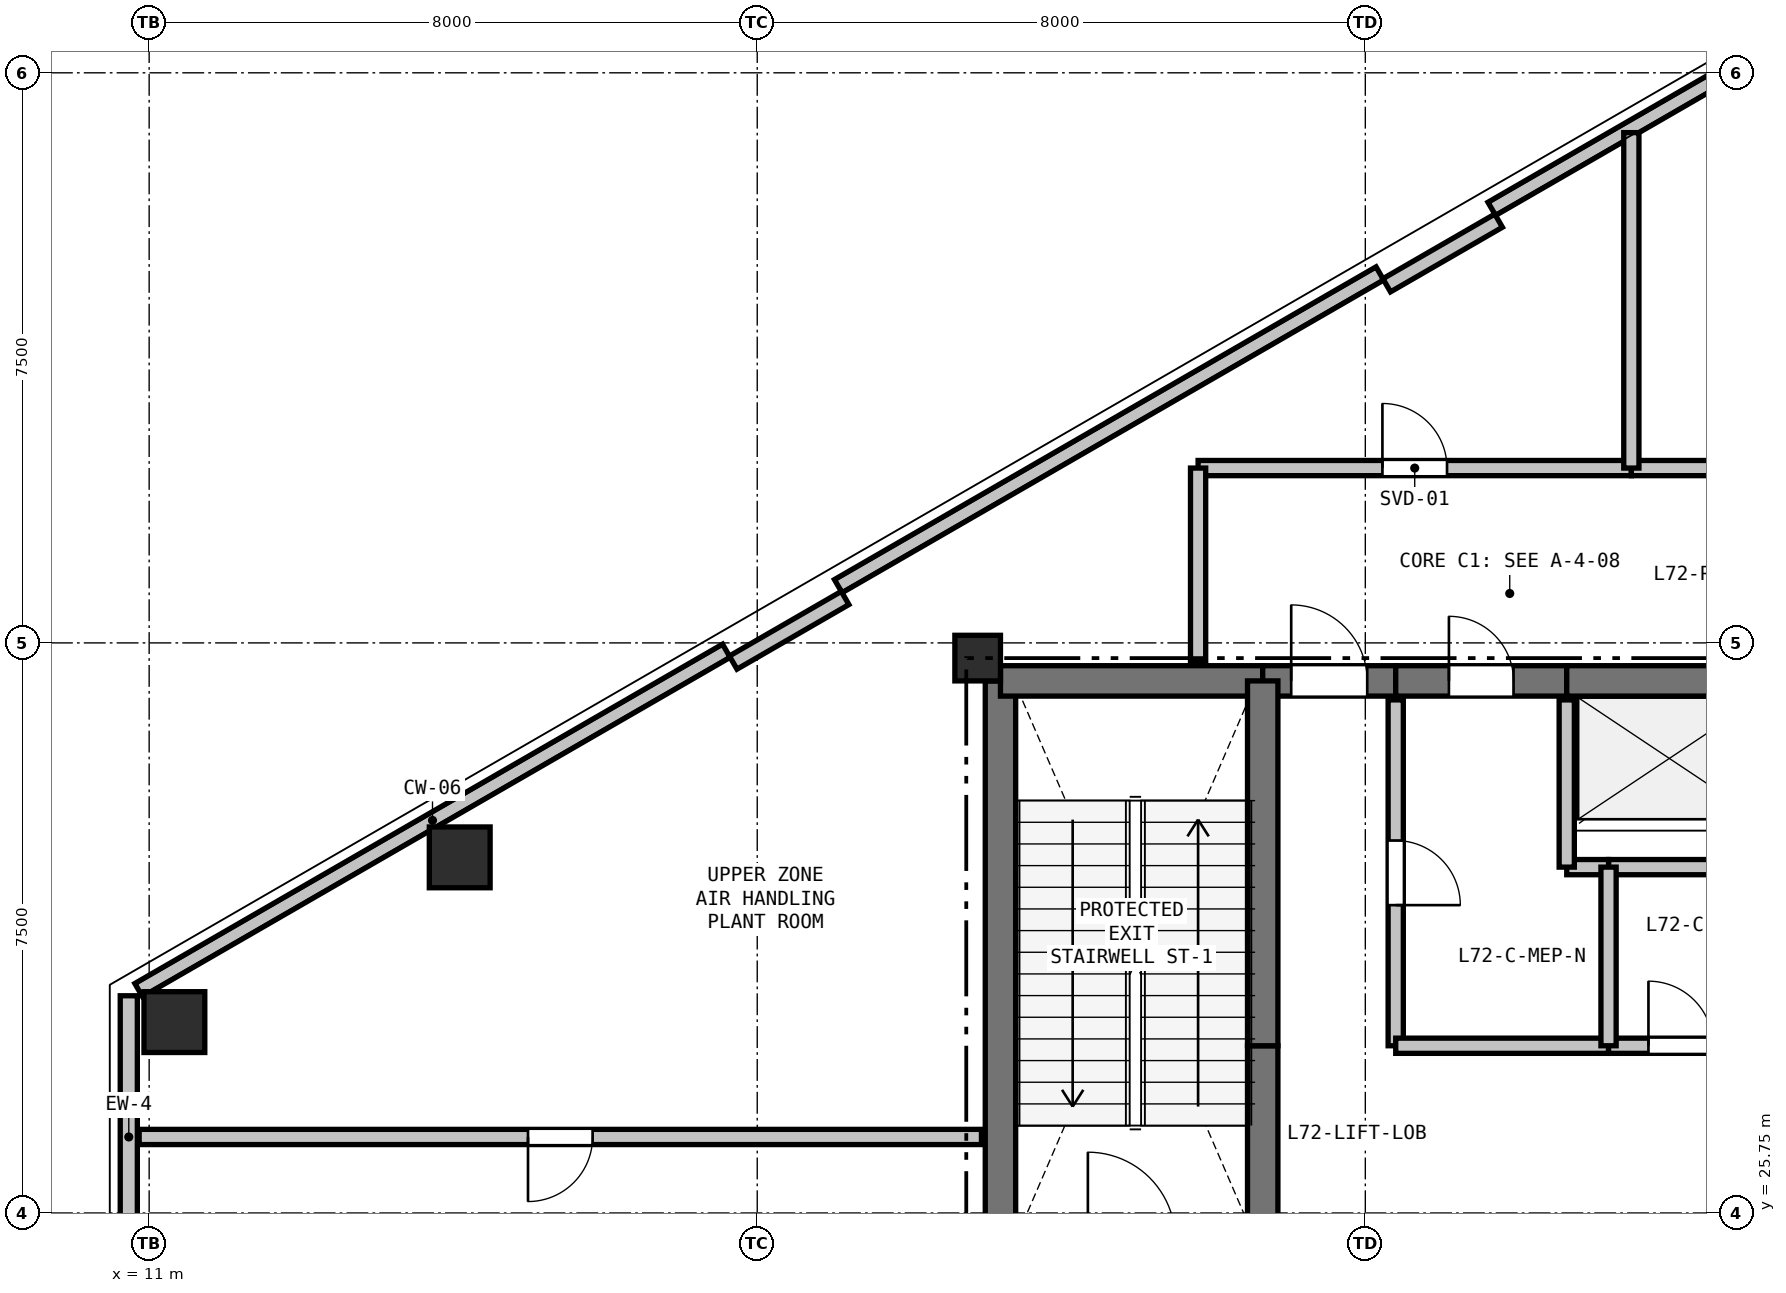
"""IFC4 building model, lengths in metres.
Left out: names, types, materials, properties, quantities, classifications, styles, units other than length and angle.
Written with IfcOpenShell. Run it as: python <this file> out.ifc"""

import sys

from ifc_helpers import new_model, si_unit, direction, frame, frame_2d, origin, origin_2d, place, context, subcontext, project, spatial, rectangle, hollow_rectangle, extrude, element, fill, save


model = new_model("IFC4")
c1 = context("Model", 3, precision=1e-05, world=origin(), true_north=direction((0.0, 1.0)))
c2 = subcontext(c1, "Body", "Model", "MODEL_VIEW")
j1 = project(units=[si_unit("LENGTHUNIT", "METRE"), si_unit("PLANEANGLEUNIT", "RADIAN")], contexts=[c1])
p1 = place(None, origin())
s1 = spatial("IfcSite", under=j1, at=p1, CompositionType="ELEMENT")
p2 = place(p1, origin())
s2 = spatial("IfcBuilding", under=s1, at=p2, CompositionType="ELEMENT")
p3 = place(p2, frame((0.0, 0.0, 258.6)))
s3 = spatial("IfcBuildingStorey", under=s2, at=p3, CompositionType="ELEMENT", Elevation=258.6)
p4 = place(p3, frame((21.9, 33.05, 0.0), z_axis=(0.0, 0.0, 1.0), x_axis=(1.0, 0.0, 0.0)))
e1 = element("IfcColumn", 1, at=p4, inside=s3, PredefinedType="COLUMN", context=c2, shape_type="SweptSolid", body=[
    extrude(rectangle(XDim=0.6, YDim=0.6, at=origin_2d()), origin(), (0.0, 0.0, 1.0), 5.4),
])
for number, where, z_axis, x_axis in (
    (2, (11.332, 28.261, 0.0), (0.0, 0.0, 1.0), (1.0, 0.0, 0.0)),
    (3, (15.086, 30.428, 0.0), (0.0, 0.0, 1.0), (1.0, 0.0, 0.0)),
):
    element("IfcColumn", number, at=place(p3, frame(where, z_axis=z_axis, x_axis=x_axis)), inside=s3, PredefinedType="COLUMN", context=c2, shape_type="SweptSolid", body=[
        extrude(hollow_rectangle(XDim=0.8, YDim=0.8, WallThickness=0.025, at=origin_2d()), origin(), (0.0, 0.0, 1.0), 5.4),
    ])
p5 = place(p3, frame((10.732, 24.892, 0.0), z_axis=(0.0, 0.0, 1.0), x_axis=(0.0, 1.0, 0.0)))
e4 = element("IfcWall", 4, at=p5, inside=s3, PredefinedType="SOLIDWALL", context=c2, shape_type="SweptSolid", body=[
    extrude(rectangle(XDim=3.715, YDim=0.225, at=frame_2d((1.858, 0.0))), origin(), (0.0, 0.0, 1.0), 4.7),
])
p6 = place(p3, frame((10.862, 28.683, 0.0), z_axis=(0.0, 0.0, 1.0), x_axis=(0.866026655105, 0.499997832642, 0.0)))
e5 = element("IfcWall", 5, at=p6, inside=s3, PredefinedType="PARAPET", context=c2, shape_type="SweptSolid", body=[
    extrude(rectangle(XDim=8.928, YDim=0.2, at=frame_2d((4.464, 0.0))), origin(), (0.0, 0.0, 1.0), 0.2),
])
p7 = place(p3, frame((20.066, 33.997, 0.0), z_axis=(0.0, 0.0, 1.0), x_axis=(0.866019557082, 0.500010126649, 0.0)))
e6 = element("IfcWall", 6, at=p7, inside=s3, PredefinedType="PARAPET", context=c2, shape_type="SweptSolid", body=[
    extrude(rectangle(XDim=8.228, YDim=0.2, at=frame_2d((4.114, 0.0))), origin(), (0.0, 0.0, 1.0), 0.2),
])
p8 = place(p3, frame((28.664, 38.96, 0.0), z_axis=(0.0, 0.0, 1.0), x_axis=(0.866026655105, 0.499997832642, 0.0)))
e7 = element("IfcWall", 7, at=p8, inside=s3, PredefinedType="PARAPET", context=c2, shape_type="SweptSolid", body=[
    extrude(rectangle(XDim=8.928, YDim=0.2, at=frame_2d((4.464, 0.0))), origin(), (0.0, 0.0, 1.0), 0.2),
])
for number, where, z_axis, x_axis in (
    (8, (18.684, 32.991, 0.0), (0.0, 0.0, 1.0), (0.866, 0.5, 0.0)),
    (9, (27.281, 37.955, 0.0), (0.0, 0.0, 1.0), (0.866, 0.5, 0.0)),
):
    element("IfcWall", number, at=place(p3, frame(where, z_axis=z_axis, x_axis=x_axis)), inside=s3, PredefinedType="PARAPET", context=c2, shape_type="SweptSolid", body=[
        extrude(rectangle(XDim=1.7, YDim=0.2, at=frame_2d((0.85, 0.0))), origin(), (0.0, 0.0, 1.0), 4.7),
    ])
p9 = place(p3, frame((22.2, 25.4, 0.0), z_axis=(0.0, 0.0, 1.0), x_axis=(0.0, 1.0, 0.0)))
e10 = element("IfcWall", 10, at=p9, inside=s3, PredefinedType="SHEAR", context=c2, shape_type="SweptSolid", body=[
    extrude(rectangle(XDim=7.35, YDim=0.4, at=frame_2d((3.675, 0.0))), origin(), (0.0, 0.0, 1.0), 5.08),
])
p10 = place(p3, frame((22.2, 32.75, 0.0), z_axis=(0.0, 0.0, 1.0), x_axis=(1.0, 0.0, 0.0)))
e11 = element("IfcWall", 11, at=p10, inside=s3, PredefinedType="SHEAR", context=c2, shape_type="SweptSolid", body=[
    extrude(rectangle(XDim=3.45, YDim=0.4, at=frame_2d((1.725, 0.0))), origin(), (0.0, 0.0, 1.0), 5.08),
])
p11 = place(p3, frame((25.65, 32.75, 0.0), z_axis=(0.0, 0.0, 1.0), x_axis=(1.0, 0.0, 0.0)))
e12 = element("IfcWall", 12, at=p11, inside=s3, PredefinedType="SHEAR", context=c2, shape_type="SweptSolid", body=[
    extrude(rectangle(XDim=1.75, YDim=0.4, at=frame_2d((0.875, 0.0))), origin(), (0.0, 0.0, 1.0), 5.08),
])
p12 = place(p11, frame((0.375, 0.0, 0.0)))
e13 = element("IfcOpeningElement", 13, at=p12, cuts=e12, PredefinedType="OPENING", context=c2, shape_type="SweptSolid", body=[
    extrude(rectangle(XDim=1.0, YDim=2.15, at=frame_2d((0.5, 1.075))), frame((0.0, 0.21, 0.0), z_axis=(0.0, -1.0, 0.0), x_axis=(1.0, 0.0, 0.0)), (0.0, 0.0, 1.0), 0.42),
])
p13 = place(p3, frame((27.4, 32.75, 0.0), z_axis=(0.0, 0.0, 1.0), x_axis=(1.0, 0.0, 0.0)))
e14 = element("IfcWall", 14, at=p13, inside=s3, PredefinedType="SHEAR", context=c2, shape_type="SweptSolid", body=[
    extrude(rectangle(XDim=2.25, YDim=0.4, at=frame_2d((1.125, 0.0))), origin(), (0.0, 0.0, 1.0), 5.08),
])
p14 = place(p13, frame((0.7, 0.0, 0.0)))
e15 = element("IfcOpeningElement", 15, at=p14, cuts=e14, PredefinedType="OPENING", context=c2, shape_type="SweptSolid", body=[
    extrude(rectangle(XDim=0.85, YDim=2.1, at=frame_2d((0.425, 1.05))), frame((0.0, 0.21, 0.0), z_axis=(0.0, -1.0, 0.0), x_axis=(1.0, 0.0, 0.0)), (0.0, 0.0, 1.0), 0.42),
])
p15 = place(p3, frame((29.65, 32.75, 0.0), z_axis=(0.0, 0.0, 1.0), x_axis=(1.0, 0.0, 0.0)))
e16 = element("IfcWall", 16, at=p15, inside=s3, PredefinedType="SHEAR", context=c2, shape_type="SweptSolid", body=[
    extrude(rectangle(XDim=2.7, YDim=0.4, at=frame_2d((1.35, 0.0))), origin(), (0.0, 0.0, 1.0), 5.08),
])
p16 = place(p3, frame((25.65, 25.55, 0.0), z_axis=(0.0, 0.0, 1.0), x_axis=(0.0, 1.0, 0.0)))
e17 = element("IfcWall", 17, at=p16, inside=s3, PredefinedType="SHEAR", context=c2, shape_type="SweptSolid", body=[
    extrude(rectangle(XDim=2.4, YDim=0.4, at=frame_2d((1.2, 0.0))), origin(), (0.0, 0.0, 1.0), 5.08),
])
p17 = place(p3, frame((25.65, 27.95, 0.0), z_axis=(0.0, 0.0, 1.0), x_axis=(0.0, 1.0, 0.0)))
e18 = element("IfcWall", 18, at=p17, inside=s3, PredefinedType="SHEAR", context=c2, shape_type="SweptSolid", body=[
    extrude(rectangle(XDim=4.8, YDim=0.4, at=frame_2d((2.4, 0.0))), origin(), (0.0, 0.0, 1.0), 5.08),
])
p18 = place(p3, frame((32.1, 30.3, 0.0), z_axis=(0.0, 0.0, 1.0), x_axis=(-1.0, 0.0, 0.0)))
e19 = element("IfcWall", 19, at=p18, inside=s3, PredefinedType="PARTITIONING", context=c2, shape_type="SweptSolid", body=[
    extrude(rectangle(XDim=1.9, YDim=0.2, at=frame_2d((0.95, 0.0))), origin(), (0.0, 0.0, 1.0), 5.08),
])
p19 = place(p3, frame((30.2, 30.3, 0.0), z_axis=(0.0, 0.0, 1.0), x_axis=(-1.0, 0.0, 0.0)))
e20 = element("IfcWall", 20, at=p19, inside=s3, PredefinedType="PARTITIONING", context=c2, shape_type="SweptSolid", body=[
    extrude(rectangle(XDim=0.55, YDim=0.2, at=frame_2d((0.275, 0.0))), origin(), (0.0, 0.0, 1.0), 5.08),
])
p20 = place(p3, frame((29.65, 30.3, 0.0), z_axis=(0.0, 0.0, 1.0), x_axis=(0.0, 1.0, 0.0)))
e21 = element("IfcWall", 21, at=p20, inside=s3, PredefinedType="PARTITIONING", context=c2, shape_type="SweptSolid", body=[
    extrude(rectangle(XDim=2.2, YDim=0.2, at=frame_2d((1.1, 0.0))), origin(), (0.0, 0.0, 1.0), 5.08),
])
p21 = place(p3, frame((27.4, 32.5, 0.0), z_axis=(0.0, 0.0, 1.0), x_axis=(0.0, -1.0, 0.0)))
e22 = element("IfcWall", 22, at=p21, inside=s3, PredefinedType="PARTITIONING", context=c2, shape_type="SweptSolid", body=[
    extrude(rectangle(XDim=4.55, YDim=0.2, at=frame_2d((2.275, 0.0))), origin(), (0.0, 0.0, 1.0), 5.08),
])
p22 = place(p21, frame((1.85, 0.0, 0.0)))
e23 = element("IfcOpeningElement", 23, at=p22, cuts=e22, PredefinedType="OPENING", context=c2, shape_type="SweptSolid", body=[
    extrude(rectangle(XDim=0.85, YDim=2.1, at=frame_2d((0.425, 1.05))), frame((0.0, 0.11, 0.0), z_axis=(0.0, -1.0, 0.0), x_axis=(1.0, 0.0, 0.0)), (0.0, 0.0, 1.0), 0.22),
])
p23 = place(p3, frame((27.4, 27.95, 0.0), z_axis=(0.0, 0.0, 1.0), x_axis=(1.0, 0.0, 0.0)))
e24 = element("IfcWall", 24, at=p23, inside=s3, PredefinedType="PARTITIONING", context=c2, shape_type="SweptSolid", body=[
    extrude(rectangle(XDim=2.8, YDim=0.2, at=frame_2d((1.4, 0.0))), origin(), (0.0, 0.0, 1.0), 5.08),
])
p24 = place(p3, frame((30.2, 27.95, 0.0), z_axis=(0.0, 0.0, 1.0), x_axis=(1.0, 0.0, 0.0)))
e25 = element("IfcWall", 25, at=p24, inside=s3, PredefinedType="PARTITIONING", context=c2, shape_type="SweptSolid", body=[
    extrude(rectangle(XDim=1.9, YDim=0.2, at=frame_2d((0.95, 0.0))), origin(), (0.0, 0.0, 1.0), 5.08),
])
p25 = place(p24, frame((0.525, 0.0, 0.0)))
e26 = element("IfcOpeningElement", 26, at=p25, cuts=e25, PredefinedType="OPENING", context=c2, shape_type="SweptSolid", body=[
    extrude(rectangle(XDim=0.85, YDim=2.1, at=frame_2d((0.425, 1.05))), frame((0.0, 0.11, 0.0), z_axis=(0.0, -1.0, 0.0), x_axis=(1.0, 0.0, 0.0)), (0.0, 0.0, 1.0), 0.22),
])
p26 = place(p3, frame((24.8, 35.55, 0.0), z_axis=(0.0, 0.0, 1.0), x_axis=(1.0, 0.0, 0.0)))
e27 = element("IfcWall", 27, at=p26, inside=s3, PredefinedType="PARTITIONING", context=c2, shape_type="SweptSolid", body=[
    extrude(rectangle(XDim=5.7, YDim=0.2, at=frame_2d((2.85, 0.0))), origin(), (0.0, 0.0, 1.0), 5.08),
])
p27 = place(p26, frame((2.425, 0.0, 0.0)))
e28 = element("IfcOpeningElement", 28, at=p27, cuts=e27, PredefinedType="OPENING", context=c2, shape_type="SweptSolid", body=[
    extrude(rectangle(XDim=0.85, YDim=2.1, at=frame_2d((0.425, 1.05))), frame((0.0, 0.11, 0.0), z_axis=(0.0, -1.0, 0.0), x_axis=(1.0, 0.0, 0.0)), (0.0, 0.0, 1.0), 0.22),
])
p28 = place(p3, frame((30.5, 35.55, 0.0), z_axis=(0.0, 0.0, 1.0), x_axis=(1.0, 0.0, 0.0)))
e29 = element("IfcWall", 29, at=p28, inside=s3, PredefinedType="PARTITIONING", context=c2, shape_type="SweptSolid", body=[
    extrude(rectangle(XDim=7.35, YDim=0.2, at=frame_2d((3.675, 0.0))), origin(), (0.0, 0.0, 1.0), 4.528),
])
p29 = place(p28, frame((3.25, 0.0, 0.0)))
e30 = element("IfcOpeningElement", 30, at=p29, cuts=e29, PredefinedType="OPENING", context=c2, shape_type="SweptSolid", body=[
    extrude(rectangle(XDim=0.85, YDim=2.1, at=frame_2d((0.425, 1.05))), frame((0.0, 0.11, 0.0), z_axis=(0.0, -1.0, 0.0), x_axis=(1.0, 0.0, 0.0)), (0.0, 0.0, 1.0), 0.22),
])
p30 = place(p3, frame((24.8, 33.0, 0.0), z_axis=(0.0, 0.0, 1.0), x_axis=(0.0, 1.0, 0.0)))
e31 = element("IfcWall", 31, at=p30, inside=s3, PredefinedType="PARTITIONING", context=c2, shape_type="SweptSolid", body=[
    extrude(rectangle(XDim=2.55, YDim=0.2, at=frame_2d((1.275, 0.0))), origin(), (0.0, 0.0, 1.0), 4.605),
])
p31 = place(p3, frame((30.2, 30.3, 0.0), z_axis=(0.0, 0.0, 1.0), x_axis=(0.0, -1.0, 0.0)))
e32 = element("IfcWall", 32, at=p31, inside=s3, PredefinedType="PARTITIONING", context=c2, shape_type="SweptSolid", body=[
    extrude(rectangle(XDim=2.35, YDim=0.2, at=frame_2d((1.175, 0.0))), origin(), (0.0, 0.0, 1.0), 5.08),
])
p32 = place(p3, frame((30.5, 35.55, 0.0), z_axis=(0.0, 0.0, 1.0), x_axis=(0.0, 1.0, 0.0)))
e33 = element("IfcWall", 33, at=p32, inside=s3, PredefinedType="PARTITIONING", context=c2, shape_type="SweptSolid", body=[
    extrude(rectangle(XDim=4.413, YDim=0.2, at=frame_2d((2.207, 0.0))), origin(), (0.0, 0.0, 1.0), 4.805),
])
p33 = place(p3, frame((21.95, 26.75, 0.0), z_axis=(0.0, 0.0, 1.0), x_axis=(-1.0, 0.0, 0.0)))
e34 = element("IfcWall", 34, at=p33, inside=s3, PredefinedType="PARTITIONING", context=c2, shape_type="SweptSolid", body=[
    extrude(rectangle(XDim=11.082, YDim=0.2, at=frame_2d((5.541, 0.0))), origin(), (0.0, 0.0, 1.0), 4.605),
])
p34 = place(p33, frame((5.116, 0.0, 0.0)))
e35 = element("IfcOpeningElement", 35, at=p34, cuts=e34, PredefinedType="OPENING", context=c2, shape_type="SweptSolid", body=[
    extrude(rectangle(XDim=0.85, YDim=2.1, at=frame_2d((0.425, 1.05))), frame((0.0, 0.11, 0.0), z_axis=(0.0, -1.0, 0.0), x_axis=(1.0, 0.0, 0.0)), (0.0, 0.0, 1.0), 0.22),
])
p35 = place(p12, origin())
e36 = element("IfcDoor", 36, at=p35, inside=s3, OperationType="SINGLE_SWING_LEFT", PredefinedType="DOOR", context=c2, shape_type="SweptSolid", body=[
    extrude(rectangle(XDim=1.0, YDim=2.15, at=frame_2d((0.5, 1.075))), frame((0.0, 0.025, 0.0), z_axis=(0.0, -1.0, 0.0), x_axis=(1.0, 0.0, 0.0)), (0.0, 0.0, 1.0), 0.05),
])
fill(e13, e36)
p36 = place(p22, origin())
e37 = element("IfcDoor", 37, at=p36, inside=s3, OperationType="SINGLE_SWING_RIGHT", PredefinedType="DOOR", context=c2, shape_type="SweptSolid", body=[
    extrude(rectangle(XDim=0.85, YDim=2.1, at=frame_2d((0.425, 1.05))), frame((0.0, 0.025, 0.0), z_axis=(0.0, -1.0, 0.0), x_axis=(1.0, 0.0, 0.0)), (0.0, 0.0, 1.0), 0.05),
])
fill(e23, e37)
p37 = place(p25, origin())
e38 = element("IfcDoor", 38, at=p37, inside=s3, OperationType="SINGLE_SWING_LEFT", PredefinedType="DOOR", context=c2, shape_type="SweptSolid", body=[
    extrude(rectangle(XDim=0.85, YDim=2.1, at=frame_2d((0.425, 1.05))), frame((0.0, 0.025, 0.0), z_axis=(0.0, -1.0, 0.0), x_axis=(1.0, 0.0, 0.0)), (0.0, 0.0, 1.0), 0.05),
])
fill(e26, e38)
p38 = place(p14, origin())
e39 = element("IfcDoor", 39, at=p38, inside=s3, OperationType="SINGLE_SWING_LEFT", PredefinedType="DOOR", context=c2, shape_type="SweptSolid", body=[
    extrude(rectangle(XDim=0.85, YDim=2.1, at=frame_2d((0.425, 1.05))), frame((0.0, 0.025, 0.0), z_axis=(0.0, -1.0, 0.0), x_axis=(1.0, 0.0, 0.0)), (0.0, 0.0, 1.0), 0.05),
])
fill(e15, e39)
p39 = place(p27, origin())
e40 = element("IfcDoor", 40, at=p39, inside=s3, OperationType="SINGLE_SWING_LEFT", PredefinedType="DOOR", context=c2, shape_type="SweptSolid", body=[
    extrude(rectangle(XDim=0.85, YDim=2.1, at=frame_2d((0.425, 1.05))), frame((0.0, 0.025, 0.0), z_axis=(0.0, -1.0, 0.0), x_axis=(1.0, 0.0, 0.0)), (0.0, 0.0, 1.0), 0.05),
])
fill(e28, e40)
p40 = place(p34, origin())
e41 = element("IfcDoor", 41, at=p40, inside=s3, OperationType="SINGLE_SWING_RIGHT", PredefinedType="DOOR", context=c2, shape_type="SweptSolid", body=[
    extrude(rectangle(XDim=0.85, YDim=2.1, at=frame_2d((0.425, 1.05))), frame((0.0, 0.025, 0.0), z_axis=(0.0, -1.0, 0.0), x_axis=(1.0, 0.0, 0.0)), (0.0, 0.0, 1.0), 0.05),
])
fill(e35, e41)
save(model, sys.argv[1])
